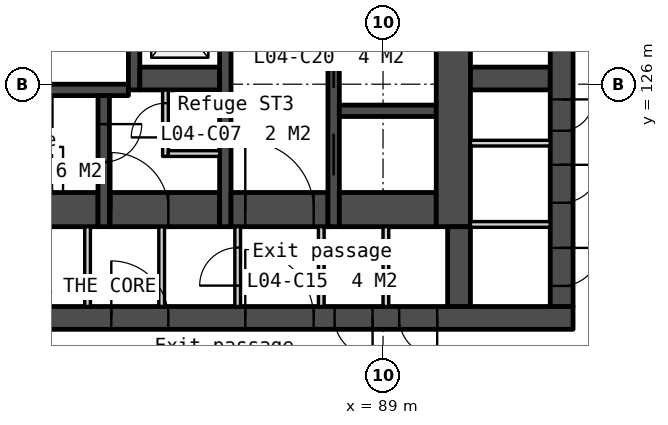
"""IFC4 building model, lengths in metres.
Left out: names, types, materials, properties, quantities, classifications, styles, units other than length and angle.
Written with IfcOpenShell. Run it as: python <this file> out.ifc"""

import sys

from ifc_helpers import new_model, si_unit, direction, frame, frame_2d, origin, place, context, subcontext, project, spatial, rectangle, extrude, element, fill, save


model = new_model("IFC4")
c1 = context("Model", 3, precision=1e-05, world=origin(), true_north=direction((0.0, 1.0)))
c2 = subcontext(c1, "Body", "Model", "MODEL_VIEW")
j1 = project(units=[si_unit("LENGTHUNIT", "METRE"), si_unit("PLANEANGLEUNIT", "RADIAN")], contexts=[c1])
p1 = place(None, origin())
s1 = spatial("IfcSite", under=j1, at=p1, CompositionType="ELEMENT")
p2 = place(p1, origin())
s2 = spatial("IfcBuilding", under=s1, at=p2, CompositionType="ELEMENT")
p3 = place(p2, frame((0.0, 0.0, 25.0)))
s3 = spatial("IfcBuildingStorey", under=s2, at=p3, CompositionType="ELEMENT", Elevation=25.0)
p4 = place(p3, frame((66.0, 119.85, 0.0), z_axis=(0.0, 0.0, 1.0), x_axis=(1.0, 0.0, 0.0)))
e1 = element("IfcWall", 1, at=p4, inside=s3, PredefinedType="SOLIDWALL", context=c2, shape_type="SweptSolid", body=[
    extrude(rectangle(XDim=28.0, YDim=0.6, at=frame_2d((14.0, 0.0))), origin(), (0.0, 0.0, 1.0), 4.7),
])
p5 = place(p4, frame((6.825, 0.0, 0.0)))
e2 = element("IfcOpeningElement", 2, at=p5, cuts=e1, PredefinedType="OPENING", context=c2, shape_type="SweptSolid", body=[
    extrude(rectangle(XDim=1.8, YDim=2.1, at=frame_2d((0.9, 1.05))), frame((0.0, 0.31, 0.0), z_axis=(0.0, -1.0, 0.0), x_axis=(1.0, 0.0, 0.0)), (0.0, 0.0, 1.0), 0.62),
])
p6 = place(p4, frame((15.85, 0.0, 0.0)))
e3 = element("IfcOpeningElement", 3, at=p6, cuts=e1, PredefinedType="OPENING", context=c2, shape_type="SweptSolid", body=[
    extrude(rectangle(XDim=1.5, YDim=2.1, at=frame_2d((0.75, 1.05))), frame((0.0, 0.31, 0.0), z_axis=(0.0, -1.0, 0.0), x_axis=(1.0, 0.0, 0.0)), (0.0, 0.0, 1.0), 0.62),
])
p7 = place(p4, frame((19.375, 0.0, 0.0)))
e4 = element("IfcOpeningElement", 4, at=p7, cuts=e1, PredefinedType="OPENING", context=c2, shape_type="SweptSolid", body=[
    extrude(rectangle(XDim=1.8, YDim=2.1, at=frame_2d((0.9, 1.05))), frame((0.0, 0.31, 0.0), z_axis=(0.0, -1.0, 0.0), x_axis=(1.0, 0.0, 0.0)), (0.0, 0.0, 1.0), 0.62),
])
p8 = place(p4, frame((4.425, 0.0, 0.0)))
e5 = element("IfcOpeningElement", 5, at=p8, cuts=e1, PredefinedType="OPENING", context=c2, shape_type="SweptSolid", body=[
    extrude(rectangle(XDim=1.0, YDim=2.1, at=frame_2d((0.5, 1.05))), frame((0.0, 0.31, 0.0), z_axis=(0.0, -1.0, 0.0), x_axis=(1.0, 0.0, 0.0)), (0.0, 0.0, 1.0), 0.62),
])
p9 = place(p4, frame((9.925, 0.0, 0.0)))
e6 = element("IfcOpeningElement", 6, at=p9, cuts=e1, PredefinedType="OPENING", context=c2, shape_type="SweptSolid", body=[
    extrude(rectangle(XDim=1.0, YDim=2.1, at=frame_2d((0.5, 1.05))), frame((0.0, 0.31, 0.0), z_axis=(0.0, -1.0, 0.0), x_axis=(1.0, 0.0, 0.0)), (0.0, 0.0, 1.0), 0.62),
])
p10 = place(p4, frame((13.125, 0.0, 0.0)))
e7 = element("IfcOpeningElement", 7, at=p10, cuts=e1, PredefinedType="OPENING", context=c2, shape_type="SweptSolid", body=[
    extrude(rectangle(XDim=1.0, YDim=2.1, at=frame_2d((0.5, 1.05))), frame((0.0, 0.31, 0.0), z_axis=(0.0, -1.0, 0.0), x_axis=(1.0, 0.0, 0.0)), (0.0, 0.0, 1.0), 0.62),
])
p11 = place(p4, frame((21.725, 0.0, 0.0)))
e8 = element("IfcOpeningElement", 8, at=p11, cuts=e1, PredefinedType="OPENING", context=c2, shape_type="SweptSolid", body=[
    extrude(rectangle(XDim=1.0, YDim=2.1, at=frame_2d((0.5, 1.05))), frame((0.0, 0.31, 0.0), z_axis=(0.0, -1.0, 0.0), x_axis=(1.0, 0.0, 0.0)), (0.0, 0.0, 1.0), 0.62),
])
p12 = place(p4, frame((23.425, 0.0, 0.0)))
e9 = element("IfcOpeningElement", 9, at=p12, cuts=e1, PredefinedType="OPENING", context=c2, shape_type="SweptSolid", body=[
    extrude(rectangle(XDim=1.0, YDim=2.1, at=frame_2d((0.5, 1.05))), frame((0.0, 0.31, 0.0), z_axis=(0.0, -1.0, 0.0), x_axis=(1.0, 0.0, 0.0)), (0.0, 0.0, 1.0), 0.62),
])
p13 = place(p3, frame((75.3, 122.7, 0.0), z_axis=(0.0, 0.0, 1.0), x_axis=(1.0, 0.0, 0.0)))
e10 = element("IfcWall", 10, at=p13, inside=s3, PredefinedType="SOLIDWALL", context=c2, shape_type="SweptSolid", body=[
    extrude(rectangle(XDim=6.2, YDim=0.9, at=frame_2d((3.1, 0.0))), origin(), (0.0, 0.0, 1.0), 4.7),
])
p14 = place(p3, frame((77.7, 125.85, 0.0), z_axis=(0.0, 0.0, 1.0), x_axis=(1.0, 0.0, 0.0)))
e11 = element("IfcWall", 11, at=p14, inside=s3, PredefinedType="SOLIDWALL", context=c2, shape_type="SweptSolid", body=[
    extrude(rectangle(XDim=4.6, YDim=0.3, at=frame_2d((2.3, 0.0))), origin(), (0.0, 0.0, 1.0), 4.7),
])
p15 = place(p3, frame((81.225, 122.25, 0.0), z_axis=(0.0, 0.0, 1.0), x_axis=(0.0, -1.0, 0.0)))
e12 = element("IfcWall", 12, at=p15, inside=s3, PredefinedType="PARTITIONING", context=c2, shape_type="SweptSolid", body=[
    extrude(rectangle(XDim=2.1, YDim=0.15, at=frame_2d((1.05, 0.0))), origin(), (0.0, 0.0, 1.0), 4.7),
])
p16 = place(p3, frame((81.65, 125.7, 0.0), z_axis=(0.0, 0.0, 1.0), x_axis=(0.0, -1.0, 0.0)))
e13 = element("IfcWall", 13, at=p16, inside=s3, PredefinedType="SOLIDWALL", context=c2, shape_type="SweptSolid", body=[
    extrude(rectangle(XDim=3.45, YDim=0.3, at=frame_2d((1.725, 0.0))), origin(), (0.0, 0.0, 1.0), 4.7),
])
p17 = place(p16, frame((0.75, 0.0, 0.0)))
e14 = element("IfcOpeningElement", 14, at=p17, cuts=e13, PredefinedType="OPENING", context=c2, shape_type="SweptSolid", body=[
    extrude(rectangle(XDim=1.0, YDim=2.1, at=frame_2d((0.5, 1.05))), frame((0.0, 0.16, 0.0), z_axis=(0.0, -1.0, 0.0), x_axis=(1.0, 0.0, 0.0)), (0.0, 0.0, 1.0), 0.32),
])
p18 = place(p3, frame((81.8, 122.7, 0.0), z_axis=(0.0, 0.0, 1.0), x_axis=(1.0, 0.0, 0.0)))
e15 = element("IfcWall", 15, at=p18, inside=s3, PredefinedType="SOLIDWALL", context=c2, shape_type="SweptSolid", body=[
    extrude(rectangle(XDim=2.9, YDim=0.9, at=frame_2d((1.45, 0.0))), origin(), (0.0, 0.0, 1.0), 4.7),
])
p19 = place(p18, frame((0.05, 0.0, 0.0)))
e16 = element("IfcOpeningElement", 16, at=p19, cuts=e15, PredefinedType="OPENING", context=c2, shape_type="SweptSolid", body=[
    extrude(rectangle(XDim=1.5, YDim=2.1, at=frame_2d((0.75, 1.05))), frame((0.0, 0.46, 0.0), z_axis=(0.0, -1.0, 0.0), x_axis=(1.0, 0.0, 0.0)), (0.0, 0.0, 1.0), 0.92),
])
p20 = place(p3, frame((82.45, 133.95, 0.0), z_axis=(0.0, 0.0, 1.0), x_axis=(0.0, -1.0, 0.0)))
e17 = element("IfcWall", 17, at=p20, inside=s3, PredefinedType="SOLIDWALL", context=c2, shape_type="SweptSolid", body=[
    extrude(rectangle(XDim=8.1, YDim=0.3, at=frame_2d((4.05, 0.0))), origin(), (0.0, 0.0, 1.0), 4.7),
])
p21 = place(p20, frame((0.6, 0.0, 0.0)))
e18 = element("IfcOpeningElement", 18, at=p21, cuts=e17, PredefinedType="OPENING", context=c2, shape_type="SweptSolid", body=[
    extrude(rectangle(XDim=1.1, YDim=2.1, at=frame_2d((0.55, 1.05))), frame((0.0, 0.16, 0.0), z_axis=(0.0, -1.0, 0.0), x_axis=(1.0, 0.0, 0.0)), (0.0, 0.0, 1.0), 0.32),
])
p22 = place(p20, frame((3.2, 0.0, 0.0)))
e19 = element("IfcOpeningElement", 19, at=p22, cuts=e17, PredefinedType="OPENING", context=c2, shape_type="SweptSolid", body=[
    extrude(rectangle(XDim=1.1, YDim=2.1, at=frame_2d((0.55, 1.05))), frame((0.0, 0.16, 0.0), z_axis=(0.0, -1.0, 0.0), x_axis=(1.0, 0.0, 0.0)), (0.0, 0.0, 1.0), 0.32),
])
p23 = place(p20, frame((5.8, 0.0, 0.0)))
e20 = element("IfcOpeningElement", 20, at=p23, cuts=e17, PredefinedType="OPENING", context=c2, shape_type="SweptSolid", body=[
    extrude(rectangle(XDim=1.1, YDim=2.1, at=frame_2d((0.55, 1.05))), frame((0.0, 0.16, 0.0), z_axis=(0.0, -1.0, 0.0), x_axis=(1.0, 0.0, 0.0)), (0.0, 0.0, 1.0), 0.32),
])
p24 = place(p3, frame((82.6, 126.15, 0.0), z_axis=(0.0, 0.0, 1.0), x_axis=(1.0, 0.0, 0.0)))
e21 = element("IfcWall", 21, at=p24, inside=s3, PredefinedType="SOLIDWALL", context=c2, shape_type="SweptSolid", body=[
    extrude(rectangle(XDim=2.1, YDim=0.6, at=frame_2d((1.05, 0.0))), origin(), (0.0, 0.0, 1.0), 4.7),
])
p25 = place(p3, frame((83.175, 122.25, 0.0), z_axis=(0.0, 0.0, 1.0), x_axis=(0.0, -1.0, 0.0)))
e22 = element("IfcWall", 22, at=p25, inside=s3, PredefinedType="PARTITIONING", context=c2, shape_type="SweptSolid", body=[
    extrude(rectangle(XDim=2.1, YDim=0.15, at=frame_2d((1.05, 0.0))), origin(), (0.0, 0.0, 1.0), 4.7),
])
p26 = place(p3, frame((83.275, 125.85, 0.0), z_axis=(0.0, 0.0, 1.0), x_axis=(0.0, -1.0, 0.0)))
e23 = element("IfcWall", 23, at=p26, inside=s3, PredefinedType="PARTITIONING", context=c2, shape_type="SweptSolid", body=[
    extrude(rectangle(XDim=1.75, YDim=0.15, at=frame_2d((0.875, 0.0))), origin(), (0.0, 0.0, 1.0), 4.7),
])
p27 = place(p26, frame((0.35, 0.0, 0.0)))
e24 = element("IfcOpeningElement", 24, at=p27, cuts=e23, PredefinedType="OPENING", context=c2, shape_type="SweptSolid", body=[
    extrude(rectangle(XDim=0.9, YDim=2.1, at=frame_2d((0.45, 1.05))), frame((0.0, 0.085, 0.0), z_axis=(0.0, -1.0, 0.0), x_axis=(1.0, 0.0, 0.0)), (0.0, 0.0, 1.0), 0.17),
])
p28 = place(p3, frame((83.35, 124.175, 0.0), z_axis=(0.0, 0.0, 1.0), x_axis=(1.0, 0.0, 0.0)))
e25 = element("IfcWall", 25, at=p28, inside=s3, PredefinedType="PARTITIONING", context=c2, shape_type="SweptSolid", body=[
    extrude(rectangle(XDim=1.35, YDim=0.15, at=frame_2d((0.675, 0.0))), origin(), (0.0, 0.0, 1.0), 4.7),
])
p29 = place(p3, frame((84.85, 133.95, 0.0), z_axis=(0.0, 0.0, 1.0), x_axis=(0.0, -1.0, 0.0)))
e26 = element("IfcWall", 26, at=p29, inside=s3, PredefinedType="SOLIDWALL", context=c2, shape_type="SweptSolid", body=[
    extrude(rectangle(XDim=11.7, YDim=0.3, at=frame_2d((5.85, 0.0))), origin(), (0.0, 0.0, 1.0), 4.7),
])
p30 = place(p3, frame((85.0, 122.7, 0.0), z_axis=(0.0, 0.0, 1.0), x_axis=(1.0, 0.0, 0.0)))
e27 = element("IfcWall", 27, at=p30, inside=s3, PredefinedType="SOLIDWALL", context=c2, shape_type="SweptSolid", body=[
    extrude(rectangle(XDim=2.55, YDim=0.9, at=frame_2d((1.275, 0.0))), origin(), (0.0, 0.0, 1.0), 4.7),
])
p31 = place(p30, frame((0.375, 0.0, 0.0)))
e28 = element("IfcOpeningElement", 28, at=p31, cuts=e27, PredefinedType="OPENING", context=c2, shape_type="SweptSolid", body=[
    extrude(rectangle(XDim=1.8, YDim=2.1, at=frame_2d((0.9, 1.05))), frame((0.0, 0.46, 0.0), z_axis=(0.0, -1.0, 0.0), x_axis=(1.0, 0.0, 0.0)), (0.0, 0.0, 1.0), 0.92),
])
p32 = place(p3, frame((85.175, 122.25, 0.0), z_axis=(0.0, 0.0, 1.0), x_axis=(0.0, -1.0, 0.0)))
e29 = element("IfcWall", 29, at=p32, inside=s3, PredefinedType="PARTITIONING", context=c2, shape_type="SweptSolid", body=[
    extrude(rectangle(XDim=2.1, YDim=0.15, at=frame_2d((1.05, 0.0))), origin(), (0.0, 0.0, 1.0), 4.7),
])
p33 = place(p32, frame((0.55, 0.0, 0.0)))
e30 = element("IfcOpeningElement", 30, at=p33, cuts=e29, PredefinedType="OPENING", context=c2, shape_type="SweptSolid", body=[
    extrude(rectangle(XDim=1.0, YDim=2.1, at=frame_2d((0.5, 1.05))), frame((0.0, 0.085, 0.0), z_axis=(0.0, -1.0, 0.0), x_axis=(1.0, 0.0, 0.0)), (0.0, 0.0, 1.0), 0.17),
])
p34 = place(p3, frame((87.375, 122.25, 0.0), z_axis=(0.0, 0.0, 1.0), x_axis=(0.0, -1.0, 0.0)))
e31 = element("IfcWall", 31, at=p34, inside=s3, PredefinedType="PARTITIONING", context=c2, shape_type="SweptSolid", body=[
    extrude(rectangle(XDim=2.1, YDim=0.15, at=frame_2d((1.05, 0.0))), origin(), (0.0, 0.0, 1.0), 4.7),
])
p35 = place(p3, frame((87.7, 133.95, 0.0), z_axis=(0.0, 0.0, 1.0), x_axis=(0.0, -1.0, 0.0)))
e32 = element("IfcWall", 32, at=p35, inside=s3, PredefinedType="SOLIDWALL", context=c2, shape_type="SweptSolid", body=[
    extrude(rectangle(XDim=11.7, YDim=0.3, at=frame_2d((5.85, 0.0))), origin(), (0.0, 0.0, 1.0), 4.7),
])
p36 = place(p35, frame((6.95, 0.0, 0.0)))
e33 = element("IfcOpeningElement", 33, at=p36, cuts=e32, PredefinedType="OPENING", context=c2, shape_type="SweptSolid", body=[
    extrude(rectangle(XDim=1.1, YDim=2.1, at=frame_2d((0.55, 1.05))), frame((0.0, 0.16, 0.0), z_axis=(0.0, -1.0, 0.0), x_axis=(1.0, 0.0, 0.0)), (0.0, 0.0, 1.0), 0.32),
])
p37 = place(p35, frame((5.1, 0.0, 0.0)))
e34 = element("IfcOpeningElement", 34, at=p37, cuts=e32, PredefinedType="OPENING", context=c2, shape_type="SweptSolid", body=[
    extrude(rectangle(XDim=1.0, YDim=2.1, at=frame_2d((0.5, 1.05))), frame((0.0, 0.16, 0.0), z_axis=(0.0, -1.0, 0.0), x_axis=(1.0, 0.0, 0.0)), (0.0, 0.0, 1.0), 0.32),
])
p38 = place(p35, frame((9.25, 0.0, 0.0)))
e35 = element("IfcOpeningElement", 35, at=p38, cuts=e32, PredefinedType="OPENING", context=c2, shape_type="SweptSolid", body=[
    extrude(rectangle(XDim=1.1, YDim=2.1, at=frame_2d((0.55, 1.05))), frame((0.0, 0.16, 0.0), z_axis=(0.0, -1.0, 0.0), x_axis=(1.0, 0.0, 0.0)), (0.0, 0.0, 1.0), 0.32),
])
p39 = place(p3, frame((87.85, 125.3, 0.0), z_axis=(0.0, 0.0, 1.0), x_axis=(1.0, 0.0, 0.0)))
e36 = element("IfcWall", 36, at=p39, inside=s3, PredefinedType="SOLIDWALL", context=c2, shape_type="SweptSolid", body=[
    extrude(rectangle(XDim=2.55, YDim=0.3, at=frame_2d((1.275, 0.0))), origin(), (0.0, 0.0, 1.0), 4.7),
])
p40 = place(p3, frame((87.85, 122.7, 0.0), z_axis=(0.0, 0.0, 1.0), x_axis=(1.0, 0.0, 0.0)))
e37 = element("IfcWall", 37, at=p40, inside=s3, PredefinedType="SOLIDWALL", context=c2, shape_type="SweptSolid", body=[
    extrude(rectangle(XDim=2.55, YDim=0.9, at=frame_2d((1.275, 0.0))), origin(), (0.0, 0.0, 1.0), 4.7),
])
p41 = place(p3, frame((89.075, 122.25, 0.0), z_axis=(0.0, 0.0, 1.0), x_axis=(0.0, -1.0, 0.0)))
e38 = element("IfcWall", 38, at=p41, inside=s3, PredefinedType="PARTITIONING", context=c2, shape_type="SweptSolid", body=[
    extrude(rectangle(XDim=2.1, YDim=0.15, at=frame_2d((1.05, 0.0))), origin(), (0.0, 0.0, 1.0), 4.7),
])
p42 = place(p3, frame((90.85, 133.95, 0.0), z_axis=(0.0, 0.0, 1.0), x_axis=(0.0, -1.0, 0.0)))
e39 = element("IfcWall", 39, at=p42, inside=s3, PredefinedType="SOLIDWALL", context=c2, shape_type="SweptSolid", body=[
    extrude(rectangle(XDim=11.7, YDim=0.9, at=frame_2d((5.85, 0.0))), origin(), (0.0, 0.0, 1.0), 4.7),
])
p43 = place(p3, frame((91.0, 122.25, 0.0), z_axis=(0.0, 0.0, 1.0), x_axis=(0.0, -1.0, 0.0)))
e40 = element("IfcWall", 40, at=p43, inside=s3, PredefinedType="SOLIDWALL", context=c2, shape_type="SweptSolid", body=[
    extrude(rectangle(XDim=2.1, YDim=0.6, at=frame_2d((1.05, 0.0))), origin(), (0.0, 0.0, 1.0), 4.7),
])
p44 = place(p3, frame((91.3, 126.15, 0.0), z_axis=(0.0, 0.0, 1.0), x_axis=(1.0, 0.0, 0.0)))
e41 = element("IfcWall", 41, at=p44, inside=s3, PredefinedType="SOLIDWALL", context=c2, shape_type="SweptSolid", body=[
    extrude(rectangle(XDim=2.1, YDim=0.6, at=frame_2d((1.05, 0.0))), origin(), (0.0, 0.0, 1.0), 4.7),
])
for number, where, z_axis, x_axis in (
    (42, (91.3, 124.449, 0.0), (0.0, 0.0, 1.0), (1.0, 0.0, 0.0)),
    (43, (91.3, 122.309, 0.0), (0.0, 0.0, 1.0), (1.0, 0.0, 0.0)),
):
    element("IfcWall", number, at=place(p3, frame(where, z_axis=z_axis, x_axis=x_axis)), inside=s3, PredefinedType="PARTITIONING", context=c2, shape_type="SweptSolid", body=[
        extrude(rectangle(XDim=2.1, YDim=0.15, at=frame_2d((1.05, 0.0))), origin(), (0.0, 0.0, 1.0), 4.7),
    ])
p45 = place(p3, frame((93.7, 133.95, 0.0), z_axis=(0.0, 0.0, 1.0), x_axis=(0.0, -1.0, 0.0)))
e44 = element("IfcWall", 44, at=p45, inside=s3, PredefinedType="SOLIDWALL", context=c2, shape_type="SweptSolid", body=[
    extrude(rectangle(XDim=13.8, YDim=0.6, at=frame_2d((6.9, 0.0))), origin(), (0.0, 0.0, 1.0), 4.7),
])
p46 = place(p45, frame((0.6, 0.0, 0.0)))
e45 = element("IfcOpeningElement", 45, at=p46, cuts=e44, PredefinedType="OPENING", context=c2, shape_type="SweptSolid", body=[
    extrude(rectangle(XDim=1.1, YDim=2.1, at=frame_2d((0.55, 1.05))), frame((0.0, 0.31, 0.0), z_axis=(0.0, -1.0, 0.0), x_axis=(1.0, 0.0, 0.0)), (0.0, 0.0, 1.0), 0.62),
])
p47 = place(p45, frame((8.35, 0.0, 0.0)))
e46 = element("IfcOpeningElement", 46, at=p47, cuts=e44, PredefinedType="OPENING", context=c2, shape_type="SweptSolid", body=[
    extrude(rectangle(XDim=0.826, YDim=2.1, at=frame_2d((0.413, 1.05))), frame((0.0, 0.31, 0.0), z_axis=(0.0, -1.0, 0.0), x_axis=(1.0, 0.0, 0.0)), (0.0, 0.0, 1.0), 0.62),
])
p48 = place(p45, frame((10.071, 0.0, 0.0)))
e47 = element("IfcOpeningElement", 47, at=p48, cuts=e44, PredefinedType="OPENING", context=c2, shape_type="SweptSolid", body=[
    extrude(rectangle(XDim=1.0, YDim=2.1, at=frame_2d((0.5, 1.05))), frame((0.0, 0.31, 0.0), z_axis=(0.0, -1.0, 0.0), x_axis=(1.0, 0.0, 0.0)), (0.0, 0.0, 1.0), 0.62),
])
p49 = place(p45, frame((12.258, 0.0, 0.0)))
e48 = element("IfcOpeningElement", 48, at=p49, cuts=e44, PredefinedType="OPENING", context=c2, shape_type="SweptSolid", body=[
    extrude(rectangle(XDim=1.0, YDim=2.1, at=frame_2d((0.5, 1.05))), frame((0.0, 0.31, 0.0), z_axis=(0.0, -1.0, 0.0), x_axis=(1.0, 0.0, 0.0)), (0.0, 0.0, 1.0), 0.62),
])
p50 = place(p3, frame((121.754, 129.091, 0.0), z_axis=(0.0, 0.0, 1.0), x_axis=(-0.500000102728, -0.866025344474, 0.0)))
e49 = element("IfcWall", 49, at=p50, inside=s3, PredefinedType="STANDARD", context=c2, shape_type="SweptSolid", body=[
    extrude(rectangle(XDim=77.841, YDim=1.0, at=frame_2d((38.92, 0.0))), origin(), (0.0, 0.0, 1.0), 0.6),
])
p51 = place(p47, origin())
e50 = element("IfcDoor", 50, at=p51, inside=s3, OperationType="SINGLE_SWING_LEFT", PredefinedType="DOOR", context=c2, shape_type="SweptSolid", body=[
    extrude(rectangle(XDim=0.826, YDim=2.1, at=frame_2d((0.413, 1.05))), frame((0.0, 0.025, 0.0), z_axis=(0.0, -1.0, 0.0), x_axis=(1.0, 0.0, 0.0)), (0.0, 0.0, 1.0), 0.05),
])
fill(e46, e50)
p52 = place(p48, origin())
e51 = element("IfcDoor", 51, at=p52, inside=s3, OperationType="SINGLE_SWING_LEFT", PredefinedType="DOOR", context=c2, shape_type="SweptSolid", body=[
    extrude(rectangle(XDim=1.0, YDim=2.1, at=frame_2d((0.5, 1.05))), frame((0.0, 0.025, 0.0), z_axis=(0.0, -1.0, 0.0), x_axis=(1.0, 0.0, 0.0)), (0.0, 0.0, 1.0), 0.05),
])
fill(e47, e51)
p53 = place(p49, origin())
e52 = element("IfcDoor", 52, at=p53, inside=s3, OperationType="SINGLE_SWING_LEFT", PredefinedType="DOOR", context=c2, shape_type="SweptSolid", body=[
    extrude(rectangle(XDim=1.0, YDim=2.1, at=frame_2d((0.5, 1.05))), frame((0.0, 0.025, 0.0), z_axis=(0.0, -1.0, 0.0), x_axis=(1.0, 0.0, 0.0)), (0.0, 0.0, 1.0), 0.05),
])
fill(e48, e52)
p54 = place(p36, origin())
e53 = element("IfcDoor", 53, at=p54, inside=s3, OperationType="SLIDING_TO_LEFT", PredefinedType="DOOR", context=c2, shape_type="SweptSolid", body=[
    extrude(rectangle(XDim=1.1, YDim=2.1, at=frame_2d((0.55, 1.05))), frame((0.0, 0.025, 0.0), z_axis=(0.0, -1.0, 0.0), x_axis=(1.0, 0.0, 0.0)), (0.0, 0.0, 1.0), 0.05),
])
fill(e33, e53)
p55 = place(p31, origin())
e54 = element("IfcDoor", 54, at=p55, inside=s3, OperationType="DOUBLE_DOOR_DOUBLE_SWING", PredefinedType="DOOR", context=c2, shape_type="SweptSolid", body=[
    extrude(rectangle(XDim=1.8, YDim=2.1, at=frame_2d((0.9, 1.05))), frame((0.0, 0.025, 0.0), z_axis=(0.0, -1.0, 0.0), x_axis=(1.0, 0.0, 0.0)), (0.0, 0.0, 1.0), 0.05),
])
fill(e28, e54)
p56 = place(p19, origin())
e55 = element("IfcDoor", 55, at=p56, inside=s3, OperationType="DOUBLE_DOOR_DOUBLE_SWING", PredefinedType="DOOR", context=c2, shape_type="SweptSolid", body=[
    extrude(rectangle(XDim=1.5, YDim=2.1, at=frame_2d((0.75, 1.05))), frame((0.0, 0.025, 0.0), z_axis=(0.0, -1.0, 0.0), x_axis=(1.0, 0.0, 0.0)), (0.0, 0.0, 1.0), 0.05),
])
fill(e16, e55)
p57 = place(p6, origin())
e56 = element("IfcDoor", 56, at=p57, inside=s3, OperationType="DOUBLE_DOOR_DOUBLE_SWING", PredefinedType="DOOR", context=c2, shape_type="SweptSolid", body=[
    extrude(rectangle(XDim=1.5, YDim=2.1, at=frame_2d((0.75, 1.05))), frame((0.0, 0.025, 0.0), z_axis=(0.0, -1.0, 0.0), x_axis=(1.0, 0.0, 0.0)), (0.0, 0.0, 1.0), 0.05),
])
fill(e3, e56)
p58 = place(p7, origin())
e57 = element("IfcDoor", 57, at=p58, inside=s3, OperationType="DOUBLE_DOOR_DOUBLE_SWING", PredefinedType="DOOR", context=c2, shape_type="SweptSolid", body=[
    extrude(rectangle(XDim=1.8, YDim=2.1, at=frame_2d((0.9, 1.05))), frame((0.0, 0.025, 0.0), z_axis=(0.0, -1.0, 0.0), x_axis=(1.0, 0.0, 0.0)), (0.0, 0.0, 1.0), 0.05),
])
fill(e4, e57)
p59 = place(p27, origin())
e58 = element("IfcDoor", 58, at=p59, inside=s3, OperationType="SINGLE_SWING_RIGHT", PredefinedType="DOOR", context=c2, shape_type="SweptSolid", body=[
    extrude(rectangle(XDim=0.9, YDim=2.1, at=frame_2d((0.45, 1.05))), frame((0.0, 0.025, 0.0), z_axis=(0.0, -1.0, 0.0), x_axis=(1.0, 0.0, 0.0)), (0.0, 0.0, 1.0), 0.05),
])
fill(e24, e58)
p60 = place(p33, origin())
e59 = element("IfcDoor", 59, at=p60, inside=s3, OperationType="SINGLE_SWING_RIGHT", PredefinedType="DOOR", context=c2, shape_type="SweptSolid", body=[
    extrude(rectangle(XDim=1.0, YDim=2.1, at=frame_2d((0.5, 1.05))), frame((0.0, 0.025, 0.0), z_axis=(0.0, -1.0, 0.0), x_axis=(1.0, 0.0, 0.0)), (0.0, 0.0, 1.0), 0.05),
])
fill(e30, e59)
p61 = place(p11, origin())
e60 = element("IfcDoor", 60, at=p61, inside=s3, OperationType="SINGLE_SWING_RIGHT", PredefinedType="DOOR", context=c2, shape_type="SweptSolid", body=[
    extrude(rectangle(XDim=1.0, YDim=2.1, at=frame_2d((0.5, 1.05))), frame((0.0, 0.025, 0.0), z_axis=(0.0, -1.0, 0.0), x_axis=(1.0, 0.0, 0.0)), (0.0, 0.0, 1.0), 0.05),
])
fill(e8, e60)
p62 = place(p12, origin())
e61 = element("IfcDoor", 61, at=p62, inside=s3, OperationType="SINGLE_SWING_RIGHT", PredefinedType="DOOR", context=c2, shape_type="SweptSolid", body=[
    extrude(rectangle(XDim=1.0, YDim=2.1, at=frame_2d((0.5, 1.05))), frame((0.0, 0.025, 0.0), z_axis=(0.0, -1.0, 0.0), x_axis=(1.0, 0.0, 0.0)), (0.0, 0.0, 1.0), 0.05),
])
fill(e9, e61)
p63 = place(p17, origin())
e62 = element("IfcDoor", 62, at=p63, inside=s3, OperationType="SINGLE_SWING_LEFT", PredefinedType="DOOR", context=c2, shape_type="SweptSolid", body=[
    extrude(rectangle(XDim=1.0, YDim=2.1, at=frame_2d((0.5, 1.05))), frame((0.0, 0.025, 0.0), z_axis=(0.0, -1.0, 0.0), x_axis=(1.0, 0.0, 0.0)), (0.0, 0.0, 1.0), 0.05),
])
fill(e14, e62)
p64 = place(p38, origin())
e63 = element("IfcDoor", 63, at=p64, inside=s3, OperationType="SLIDING_TO_LEFT", PredefinedType="DOOR", context=c2, shape_type="SweptSolid", body=[
    extrude(rectangle(XDim=1.1, YDim=2.1, at=frame_2d((0.55, 1.05))), frame((0.0, 0.025, 0.0), z_axis=(0.0, -1.0, 0.0), x_axis=(1.0, 0.0, 0.0)), (0.0, 0.0, 1.0), 0.05),
])
fill(e35, e63)
save(model, sys.argv[1])
